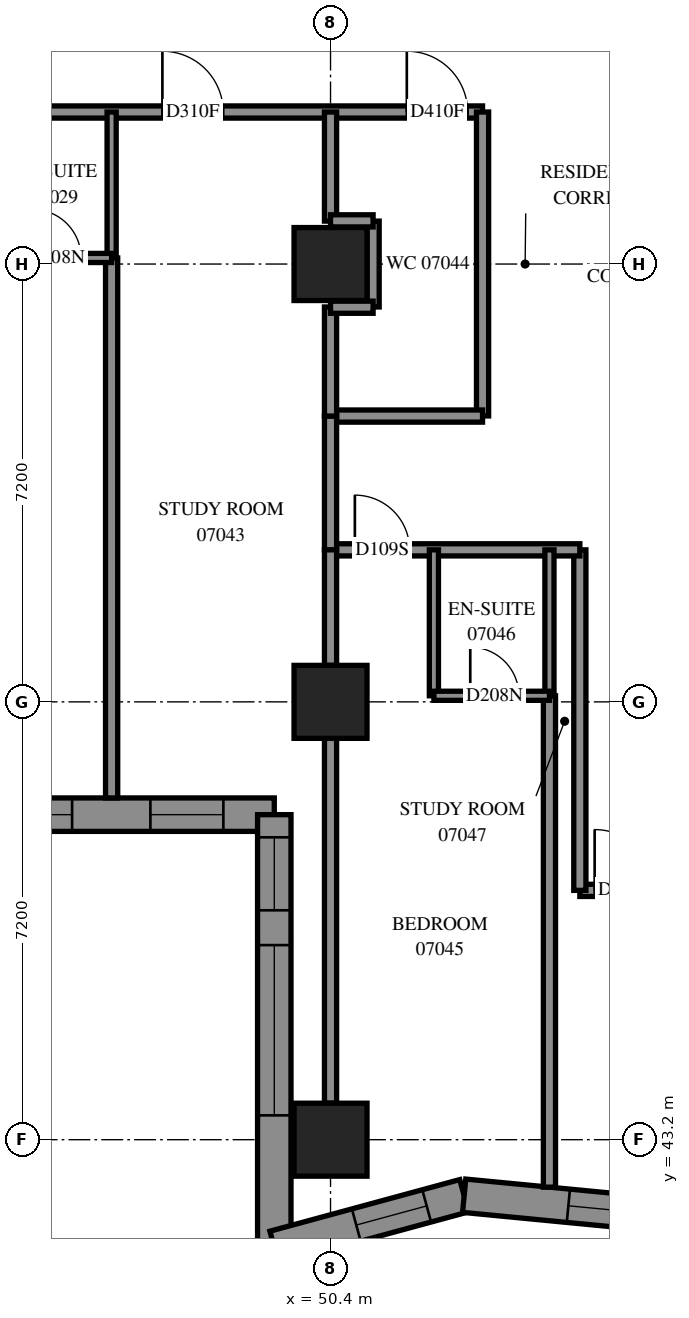
"""IFC4 building model, lengths in metres.
Left out: names, types, materials, properties, quantities, classifications, styles, units other than length and angle.
Written with IfcOpenShell. Run it as: python <this file> out.ifc"""

import sys

from ifc_helpers import new_model, si_unit, direction, frame, frame_2d, origin, origin_2d, place, context, subcontext, project, spatial, polyline, rectangle, outline, extrude, element, fill, save


model = new_model("IFC4")
c1 = context("Model", 3, precision=1e-05, world=origin(), true_north=direction((0.0, 1.0)))
c2 = subcontext(c1, "Body", "Model", "MODEL_VIEW")
j1 = project(units=[si_unit("LENGTHUNIT", "METRE"), si_unit("PLANEANGLEUNIT", "RADIAN")], contexts=[c1])
p1 = place(None, origin())
s1 = spatial("IfcSite", under=j1, at=p1, CompositionType="ELEMENT")
p2 = place(p1, origin())
s2 = spatial("IfcBuilding", under=s1, at=p2, CompositionType="ELEMENT")
p3 = place(p2, frame((0.0, 0.0, 30.4)))
s3 = spatial("IfcBuildingStorey", under=s2, at=p3, CompositionType="ELEMENT", Elevation=30.4)
for number, where, z_axis, x_axis in (
    (1, (50.4, 43.2, 0.0), (0.0, 0.0, 1.0), (1.0, 0.0, 0.0)),
    (2, (50.4, 50.4, 0.0), (0.0, 0.0, 1.0), (1.0, 0.0, 0.0)),
    (3, (50.4, 57.6, 0.0), (0.0, 0.0, 1.0), (1.0, 0.0, 0.0)),
):
    element("IfcColumn", number, at=place(p3, frame(where, z_axis=z_axis, x_axis=x_axis)), inside=s3, PredefinedType="COLUMN", context=c2, shape_type="SweptSolid", body=[
        extrude(rectangle(XDim=1.2, YDim=1.2, at=origin_2d()), origin(), (0.0, 0.0, 1.0), 3.1),
    ])
p4 = place(p3, frame((35.075, 48.545, 0.0), z_axis=(0.0, 0.0, 1.0), x_axis=(1.0, 0.0, 0.0)))
e4 = element("IfcWall", 4, at=p4, inside=s3, PredefinedType="SOLIDWALL", context=c2, shape_type="SweptSolid", body=[
    extrude(outline(polyline([(-0.275, -0.275), (14.125, -0.275), (14.675, 0.275), (0.275, 0.275), (-0.275, -0.275)])), origin(), (0.0, 0.0, 1.0), 3.1),
])
p5 = place(p4, frame((1.325, 0.0, 0.5)))
e5 = element("IfcOpeningElement", 5, at=p5, cuts=e4, PredefinedType="OPENING", context=c2, shape_type="SweptSolid", body=[
    extrude(rectangle(XDim=2.8, YDim=2.45, at=frame_2d((1.4, 1.225))), frame((0.0, 0.285, 0.0), z_axis=(0.0, -1.0, 0.0), x_axis=(1.0, 0.0, 0.0)), (0.0, 0.0, 1.0), 0.57),
])
p6 = place(p4, frame((4.925, 0.0, 0.5)))
e6 = element("IfcOpeningElement", 6, at=p6, cuts=e4, PredefinedType="OPENING", context=c2, shape_type="SweptSolid", body=[
    extrude(rectangle(XDim=2.8, YDim=2.45, at=frame_2d((1.4, 1.225))), frame((0.0, 0.285, 0.0), z_axis=(0.0, -1.0, 0.0), x_axis=(1.0, 0.0, 0.0)), (0.0, 0.0, 1.0), 0.57),
])
p7 = place(p4, frame((8.275, 0.0, 0.5)))
e7 = element("IfcOpeningElement", 7, at=p7, cuts=e4, PredefinedType="OPENING", context=c2, shape_type="SweptSolid", body=[
    extrude(rectangle(XDim=2.8, YDim=2.45, at=frame_2d((1.4, 1.225))), frame((0.0, 0.285, 0.0), z_axis=(0.0, -1.0, 0.0), x_axis=(1.0, 0.0, 0.0)), (0.0, 0.0, 1.0), 0.57),
])
p8 = place(p4, frame((12.363, 0.0, 0.5)))
e8 = element("IfcOpeningElement", 8, at=p8, cuts=e4, PredefinedType="OPENING", context=c2, shape_type="SweptSolid", body=[
    extrude(rectangle(XDim=1.2, YDim=2.45, at=frame_2d((0.6, 1.225))), frame((0.0, 0.285, 0.0), z_axis=(0.0, -1.0, 0.0), x_axis=(1.0, 0.0, 0.0)), (0.0, 0.0, 1.0), 0.57),
])
p9 = place(p3, frame((49.475, 48.545, 0.0), z_axis=(0.0, 0.0, 1.0), x_axis=(0.0, -1.0, 0.0)))
e9 = element("IfcWall", 9, at=p9, inside=s3, PredefinedType="SOLIDWALL", context=c2, shape_type="SweptSolid", body=[
    extrude(outline(polyline([(0.275, -0.275), (7.475, -0.275), (6.755, 0.275), (-0.275, 0.275), (0.275, -0.275)])), origin(), (0.0, 0.0, 1.0), 3.1),
])
p10 = place(p9, frame((2.145, 0.0, 0.5)))
e10 = element("IfcOpeningElement", 10, at=p10, cuts=e9, PredefinedType="OPENING", context=c2, shape_type="SweptSolid", body=[
    extrude(rectangle(XDim=2.8, YDim=2.45, at=frame_2d((1.4, 1.225))), frame((0.0, 0.285, 0.0), z_axis=(0.0, -1.0, 0.0), x_axis=(1.0, 0.0, 0.0)), (0.0, 0.0, 1.0), 0.57),
])
p11 = place(p9, frame((0.372, 0.0, 0.5)))
e11 = element("IfcOpeningElement", 11, at=p11, cuts=e9, PredefinedType="OPENING", context=c2, shape_type="SweptSolid", body=[
    extrude(rectangle(XDim=1.2, YDim=2.45, at=frame_2d((0.6, 1.225))), frame((0.0, 0.285, 0.0), z_axis=(0.0, -1.0, 0.0), x_axis=(1.0, 0.0, 0.0)), (0.0, 0.0, 1.0), 0.57),
])
p12 = place(p3, frame((49.475, 41.43, 0.0), z_axis=(0.0, 0.0, 1.0), x_axis=(0.9649788617, 0.262327651, 0.0)))
e12 = element("IfcWall", 12, at=p12, inside=s3, PredefinedType="SOLIDWALL", context=c2, shape_type="SweptSolid", body=[
    extrude(outline(polyline([(-0.36, -0.275), (3.186, -0.275), (3.286, 0.275), (0.36, 0.275), (-0.36, -0.275)])), origin(), (0.0, 0.0, 1.0), 3.1),
])
p13 = place(p12, frame((1.397, 0.0, 0.5)))
e13 = element("IfcOpeningElement", 13, at=p13, cuts=e12, PredefinedType="OPENING", context=c2, shape_type="SweptSolid", body=[
    extrude(rectangle(XDim=1.2, YDim=2.45, at=frame_2d((0.6, 1.225))), frame((0.0, 0.285, 0.0), z_axis=(0.0, -1.0, 0.0), x_axis=(1.0, 0.0, 0.0)), (0.0, 0.0, 1.0), 0.57),
])
p14 = place(p3, frame((52.598, 42.279, 0.0), z_axis=(0.0, 0.0, 1.0), x_axis=(0.9953800797, -0.0960130045, 0.0)))
e14 = element("IfcWall", 14, at=p14, inside=s3, PredefinedType="SOLIDWALL", context=c2, shape_type="SweptSolid", body=[
    extrude(outline(polyline([(0.05, -0.275), (3.487, -0.275), (3.434, 0.275), (-0.05, 0.275), (0.05, -0.275)])), origin(), (0.0, 0.0, 1.0), 3.1),
])
p15 = place(p14, frame((1.722, 0.0, 0.5)))
e15 = element("IfcOpeningElement", 15, at=p15, cuts=e14, PredefinedType="OPENING", context=c2, shape_type="SweptSolid", body=[
    extrude(rectangle(XDim=1.2, YDim=2.45, at=frame_2d((0.6, 1.225))), frame((0.0, 0.285, 0.0), z_axis=(0.0, -1.0, 0.0), x_axis=(1.0, 0.0, 0.0)), (0.0, 0.0, 1.0), 0.57),
])
p16 = place(p3, frame((28.8, 60.1, 0.0), z_axis=(0.0, 0.0, 1.0), x_axis=(1.0, 0.0, 0.0)))
e16 = element("IfcWall", 16, at=p16, inside=s3, PredefinedType="PARTITIONING", context=c2, shape_type="SweptSolid", body=[
    extrude(rectangle(XDim=24.1, YDim=0.2, at=frame_2d((12.05, 0.0))), origin(), (0.0, 0.0, 1.0), 3.1),
])
p17 = place(p16, frame((4.125, 0.0, 0.0)))
e17 = element("IfcOpeningElement", 17, at=p17, cuts=e16, PredefinedType="OPENING", context=c2, shape_type="SweptSolid", body=[
    extrude(rectangle(XDim=1.0, YDim=2.1, at=frame_2d((0.5, 1.05))), frame((0.0, 0.11, 0.0), z_axis=(0.0, -1.0, 0.0), x_axis=(1.0, 0.0, 0.0)), (0.0, 0.0, 1.0), 0.22),
])
p18 = place(p16, frame((11.62, 0.0, 0.0)))
e18 = element("IfcOpeningElement", 18, at=p18, cuts=e16, PredefinedType="OPENING", context=c2, shape_type="SweptSolid", body=[
    extrude(rectangle(XDim=0.9, YDim=2.1, at=frame_2d((0.45, 1.05))), frame((0.0, 0.11, 0.0), z_axis=(0.0, -1.0, 0.0), x_axis=(1.0, 0.0, 0.0)), (0.0, 0.0, 1.0), 0.22),
])
p19 = place(p16, frame((14.8, 0.0, 0.0)))
e19 = element("IfcOpeningElement", 19, at=p19, cuts=e16, PredefinedType="OPENING", context=c2, shape_type="SweptSolid", body=[
    extrude(rectangle(XDim=0.9, YDim=2.1, at=frame_2d((0.45, 1.05))), frame((0.0, 0.11, 0.0), z_axis=(0.0, -1.0, 0.0), x_axis=(1.0, 0.0, 0.0)), (0.0, 0.0, 1.0), 0.22),
])
p20 = place(p16, frame((18.835, 0.0, 0.0)))
e20 = element("IfcOpeningElement", 20, at=p20, cuts=e16, PredefinedType="OPENING", context=c2, shape_type="SweptSolid", body=[
    extrude(rectangle(XDim=1.0, YDim=2.1, at=frame_2d((0.5, 1.05))), frame((0.0, 0.11, 0.0), z_axis=(0.0, -1.0, 0.0), x_axis=(1.0, 0.0, 0.0)), (0.0, 0.0, 1.0), 0.22),
])
p21 = place(p16, frame((22.854, 0.0, 0.0)))
e21 = element("IfcOpeningElement", 21, at=p21, cuts=e16, PredefinedType="OPENING", context=c2, shape_type="SweptSolid", body=[
    extrude(rectangle(XDim=1.0, YDim=2.1, at=frame_2d((0.5, 1.05))), frame((0.0, 0.11, 0.0), z_axis=(0.0, -1.0, 0.0), x_axis=(1.0, 0.0, 0.0)), (0.0, 0.0, 1.0), 0.22),
])
p22 = place(p3, frame((54.5, 47.3, 0.0), z_axis=(0.0, 0.0, 1.0), x_axis=(1.0, 0.0, 0.0)))
e22 = element("IfcWall", 22, at=p22, inside=s3, PredefinedType="PARTITIONING", context=c2, shape_type="SweptSolid", body=[
    extrude(rectangle(XDim=19.56, YDim=0.2, at=frame_2d((9.78, 0.0))), origin(), (0.0, 0.0, 1.0), 3.1),
])
p23 = place(p22, frame((0.243, 0.0, 0.0)))
e23 = element("IfcOpeningElement", 23, at=p23, cuts=e22, PredefinedType="OPENING", context=c2, shape_type="SweptSolid", body=[
    extrude(rectangle(XDim=1.0, YDim=2.1, at=frame_2d((0.5, 1.05))), frame((0.0, 0.11, 0.0), z_axis=(0.0, -1.0, 0.0), x_axis=(1.0, 0.0, 0.0)), (0.0, 0.0, 1.0), 0.22),
])
p24 = place(p22, frame((5.4, 0.0, 0.0)))
e24 = element("IfcOpeningElement", 24, at=p24, cuts=e22, PredefinedType="OPENING", context=c2, shape_type="SweptSolid", body=[
    extrude(rectangle(XDim=0.9, YDim=2.1, at=frame_2d((0.45, 1.05))), frame((0.0, 0.11, 0.0), z_axis=(0.0, -1.0, 0.0), x_axis=(1.0, 0.0, 0.0)), (0.0, 0.0, 1.0), 0.22),
])
p25 = place(p22, frame((7.1, 0.0, 0.0)))
e25 = element("IfcOpeningElement", 25, at=p25, cuts=e22, PredefinedType="OPENING", context=c2, shape_type="SweptSolid", body=[
    extrude(rectangle(XDim=0.9, YDim=2.1, at=frame_2d((0.45, 1.05))), frame((0.0, 0.11, 0.0), z_axis=(0.0, -1.0, 0.0), x_axis=(1.0, 0.0, 0.0)), (0.0, 0.0, 1.0), 0.22),
])
p26 = place(p22, frame((12.6, 0.0, 0.0)))
e26 = element("IfcOpeningElement", 26, at=p26, cuts=e22, PredefinedType="OPENING", context=c2, shape_type="SweptSolid", body=[
    extrude(rectangle(XDim=0.9, YDim=2.1, at=frame_2d((0.45, 1.05))), frame((0.0, 0.11, 0.0), z_axis=(0.0, -1.0, 0.0), x_axis=(1.0, 0.0, 0.0)), (0.0, 0.0, 1.0), 0.22),
])
p27 = place(p22, frame((14.3, 0.0, 0.0)))
e27 = element("IfcOpeningElement", 27, at=p27, cuts=e22, PredefinedType="OPENING", context=c2, shape_type="SweptSolid", body=[
    extrude(rectangle(XDim=0.9, YDim=2.1, at=frame_2d((0.45, 1.05))), frame((0.0, 0.11, 0.0), z_axis=(0.0, -1.0, 0.0), x_axis=(1.0, 0.0, 0.0)), (0.0, 0.0, 1.0), 0.22),
])
p28 = place(p3, frame((46.8, 48.82, 0.0), z_axis=(0.0, 0.0, 1.0), x_axis=(0.0, 1.0, 0.0)))
e28 = element("IfcWall", 28, at=p28, inside=s3, PredefinedType="PARTITIONING", context=c2, shape_type="SweptSolid", body=[
    extrude(rectangle(XDim=8.88, YDim=0.2, at=frame_2d((4.44, 0.0))), origin(), (0.0, 0.0, 1.0), 3.1),
])
p29 = place(p3, frame((54.0, 42.42, 0.0), z_axis=(0.0, 0.0, 1.0), x_axis=(0.0, 1.0, 0.0)))
e29 = element("IfcWall", 29, at=p29, inside=s3, PredefinedType="PARTITIONING", context=c2, shape_type="SweptSolid", body=[
    extrude(rectangle(XDim=8.08, YDim=0.2, at=frame_2d((4.04, 0.0))), origin(), (0.0, 0.0, 1.0), 3.1),
])
p30 = place(p3, frame((50.4, 43.8, 0.0), z_axis=(0.0, 0.0, 1.0), x_axis=(0.0, 1.0, 0.0)))
e30 = element("IfcWall", 30, at=p30, inside=s3, PredefinedType="PARTITIONING", context=c2, shape_type="SweptSolid", body=[
    extrude(rectangle(XDim=6.0, YDim=0.2, at=frame_2d((3.0, 0.0))), origin(), (0.0, 0.0, 1.0), 2.6),
])
p31 = place(p3, frame((54.5, 47.3, 0.0), z_axis=(0.0, 0.0, 1.0), x_axis=(0.0, 1.0, 0.0)))
e31 = element("IfcWall", 31, at=p31, inside=s3, PredefinedType="PARTITIONING", context=c2, shape_type="SweptSolid", body=[
    extrude(rectangle(XDim=5.6, YDim=0.2, at=frame_2d((2.8, 0.0))), origin(), (0.0, 0.0, 1.0), 3.1),
])
p32 = place(p3, frame((52.9, 55.102, 0.0), z_axis=(0.0, 0.0, 1.0), x_axis=(0.0, 1.0, 0.0)))
e32 = element("IfcWall", 32, at=p32, inside=s3, PredefinedType="PARTITIONING", context=c2, shape_type="SweptSolid", body=[
    extrude(rectangle(XDim=4.998, YDim=0.2, at=frame_2d((2.499, 0.0))), origin(), (0.0, 0.0, 1.0), 3.1),
])
p33 = place(p3, frame((50.4, 52.9, 0.0), z_axis=(0.0, 0.0, 1.0), x_axis=(1.0, 0.0, 0.0)))
e33 = element("IfcWall", 33, at=p33, inside=s3, PredefinedType="PARTITIONING", context=c2, shape_type="SweptSolid", body=[
    extrude(rectangle(XDim=4.1, YDim=0.2, at=frame_2d((2.05, 0.0))), origin(), (0.0, 0.0, 1.0), 3.1),
])
p34 = place(p33, frame((0.4, 0.0, 0.0)))
e34 = element("IfcOpeningElement", 34, at=p34, cuts=e33, PredefinedType="OPENING", context=c2, shape_type="SweptSolid", body=[
    extrude(rectangle(XDim=0.9, YDim=2.1, at=frame_2d((0.45, 1.05))), frame((0.0, 0.11, 0.0), z_axis=(0.0, -1.0, 0.0), x_axis=(1.0, 0.0, 0.0)), (0.0, 0.0, 1.0), 0.22),
])
p35 = place(p3, frame((50.4, 55.1, 0.0), z_axis=(0.0, 0.0, 1.0), x_axis=(1.0, 0.0, 0.0)))
e35 = element("IfcWall", 35, at=p35, inside=s3, PredefinedType="PARTITIONING", context=c2, shape_type="SweptSolid", body=[
    extrude(rectangle(XDim=2.5, YDim=0.2, at=frame_2d((1.25, 0.0))), origin(), (0.0, 0.0, 1.0), 3.1),
])
for number, where, z_axis, x_axis in (
    (36, (46.8, 57.7, 0.0), (0.0, 0.0, 1.0), (0.0, 1.0, 0.0)),
    (37, (52.1, 50.5, 0.0), (0.0, 0.0, 1.0), (0.0, 1.0, 0.0)),
    (38, (54.0, 50.5, 0.0), (0.0, 0.0, 1.0), (0.0, 1.0, 0.0)),
):
    element("IfcWall", number, at=place(p3, frame(where, z_axis=z_axis, x_axis=x_axis)), inside=s3, PredefinedType="PARTITIONING", context=c2, shape_type="SweptSolid", body=[
        extrude(rectangle(XDim=2.4, YDim=0.15, at=frame_2d((1.2, 0.0))), origin(), (0.0, 0.0, 1.0), 3.1),
    ])
p36 = place(p3, frame((50.4, 52.9, 0.0), z_axis=(0.0, 0.0, 1.0), x_axis=(0.0, 1.0, 0.0)))
e39 = element("IfcWall", 39, at=p36, inside=s3, PredefinedType="PARTITIONING", context=c2, shape_type="SweptSolid", body=[
    extrude(rectangle(XDim=2.2, YDim=0.2, at=frame_2d((1.1, 0.0))), origin(), (0.0, 0.0, 1.0), 3.1),
])
p37 = place(p3, frame((44.9, 57.7, 0.0), z_axis=(0.0, 0.0, 1.0), x_axis=(1.0, 0.0, 0.0)))
e40 = element("IfcWall", 40, at=p37, inside=s3, PredefinedType="PARTITIONING", context=c2, shape_type="SweptSolid", body=[
    extrude(rectangle(XDim=1.9, YDim=0.15, at=frame_2d((0.95, 0.0))), origin(), (0.0, 0.0, 1.0), 3.1),
])
p38 = place(p37, frame((0.598, 0.0, 0.0)))
e41 = element("IfcOpeningElement", 41, at=p38, cuts=e40, PredefinedType="OPENING", context=c2, shape_type="SweptSolid", body=[
    extrude(rectangle(XDim=0.8, YDim=2.1, at=frame_2d((0.4, 1.05))), frame((0.0, 0.085, 0.0), z_axis=(0.0, -1.0, 0.0), x_axis=(1.0, 0.0, 0.0)), (0.0, 0.0, 1.0), 0.17),
])
p39 = place(p3, frame((50.4, 51.0, 0.0), z_axis=(0.0, 0.0, 1.0), x_axis=(0.0, 1.0, 0.0)))
e42 = element("IfcWall", 42, at=p39, inside=s3, PredefinedType="PARTITIONING", context=c2, shape_type="SweptSolid", body=[
    extrude(rectangle(XDim=1.9, YDim=0.2, at=frame_2d((0.95, 0.0))), origin(), (0.0, 0.0, 1.0), 3.1),
])
p40 = place(p3, frame((52.1, 50.5, 0.0), z_axis=(0.0, 0.0, 1.0), x_axis=(1.0, 0.0, 0.0)))
e43 = element("IfcWall", 43, at=p40, inside=s3, PredefinedType="PARTITIONING", context=c2, shape_type="SweptSolid", body=[
    extrude(rectangle(XDim=1.9, YDim=0.15, at=frame_2d((0.95, 0.0))), origin(), (0.0, 0.0, 1.0), 3.1),
])
p41 = place(p40, frame((0.598, 0.0, 0.0)))
e44 = element("IfcOpeningElement", 44, at=p41, cuts=e43, PredefinedType="OPENING", context=c2, shape_type="SweptSolid", body=[
    extrude(rectangle(XDim=0.8, YDim=2.1, at=frame_2d((0.4, 1.05))), frame((0.0, 0.085, 0.0), z_axis=(0.0, -1.0, 0.0), x_axis=(1.0, 0.0, 0.0)), (0.0, 0.0, 1.0), 0.17),
])
for number, where, z_axis, x_axis in (
    (45, (50.4, 58.306, 0.0), (0.0, 0.0, 1.0), (0.0, 1.0, 0.0)),
    (46, (50.4, 55.1, 0.0), (0.0, 0.0, 1.0), (0.0, 1.0, 0.0)),
):
    element("IfcWall", number, at=place(p3, frame(where, z_axis=z_axis, x_axis=x_axis)), inside=s3, PredefinedType="PARTITIONING", context=c2, shape_type="SweptSolid", body=[
        extrude(rectangle(XDim=1.794, YDim=0.2, at=frame_2d((0.897, 0.0))), origin(), (0.0, 0.0, 1.0), 3.1),
    ])
p42 = place(p3, frame((51.1, 56.894, 0.0), z_axis=(0.0, 0.0, 1.0), x_axis=(0.0, 1.0, 0.0)))
e47 = element("IfcWall", 47, at=p42, inside=s3, PredefinedType="PARTITIONING", context=c2, shape_type="SweptSolid", body=[
    extrude(rectangle(XDim=1.412, YDim=0.2, at=frame_2d((0.706, 0.0))), origin(), (0.0, 0.0, 1.0), 3.1),
])
for number, where, z_axis, x_axis in (
    (48, (50.4, 58.31, 0.0), (0.0, 0.0, 1.0), (1.0, 0.0, 0.0)),
    (49, (50.4, 56.89, 0.0), (0.0, 0.0, 1.0), (1.0, 0.0, 0.0)),
):
    element("IfcWall", number, at=place(p3, frame(where, z_axis=z_axis, x_axis=x_axis)), inside=s3, PredefinedType="PARTITIONING", context=c2, shape_type="SweptSolid", body=[
        extrude(rectangle(XDim=0.7, YDim=0.2, at=frame_2d((0.35, 0.0))), origin(), (0.0, 0.0, 1.0), 3.1),
    ])
p43 = place(p7, origin())
e50 = element("IfcWindow", 50, at=p43, inside=s3, PartitioningType="SINGLE_PANEL", PredefinedType="WINDOW", context=c2, shape_type="SweptSolid", body=[
    extrude(rectangle(XDim=2.8, YDim=2.45, at=frame_2d((1.4, 1.225))), frame((0.0, 0.155, 0.0), z_axis=(0.0, -1.0, 0.0), x_axis=(1.0, 0.0, 0.0)), (0.0, 0.0, 1.0), 0.06),
])
fill(e7, e50)
p44 = place(p8, origin())
e51 = element("IfcWindow", 51, at=p44, inside=s3, PartitioningType="SINGLE_PANEL", PredefinedType="WINDOW", context=c2, shape_type="SweptSolid", body=[
    extrude(rectangle(XDim=1.2, YDim=2.45, at=frame_2d((0.6, 1.225))), frame((0.0, 0.155, 0.0), z_axis=(0.0, -1.0, 0.0), x_axis=(1.0, 0.0, 0.0)), (0.0, 0.0, 1.0), 0.06),
])
fill(e8, e51)
p45 = place(p10, origin())
e52 = element("IfcWindow", 52, at=p45, inside=s3, PartitioningType="SINGLE_PANEL", PredefinedType="WINDOW", context=c2, shape_type="SweptSolid", body=[
    extrude(rectangle(XDim=2.8, YDim=2.45, at=frame_2d((1.4, 1.225))), frame((0.0, 0.155, 0.0), z_axis=(0.0, -1.0, 0.0), x_axis=(1.0, 0.0, 0.0)), (0.0, 0.0, 1.0), 0.06),
])
fill(e10, e52)
p46 = place(p11, origin())
e53 = element("IfcWindow", 53, at=p46, inside=s3, PartitioningType="SINGLE_PANEL", PredefinedType="WINDOW", context=c2, shape_type="SweptSolid", body=[
    extrude(rectangle(XDim=1.2, YDim=2.45, at=frame_2d((0.6, 1.225))), frame((0.0, 0.155, 0.0), z_axis=(0.0, -1.0, 0.0), x_axis=(1.0, 0.0, 0.0)), (0.0, 0.0, 1.0), 0.06),
])
fill(e11, e53)
p47 = place(p13, origin())
e54 = element("IfcWindow", 54, at=p47, inside=s3, PartitioningType="SINGLE_PANEL", PredefinedType="WINDOW", context=c2, shape_type="SweptSolid", body=[
    extrude(rectangle(XDim=1.2, YDim=2.45, at=frame_2d((0.6, 1.225))), frame((0.0, 0.155, 0.0), z_axis=(0.0, -1.0, 0.0), x_axis=(1.0, 0.0, 0.0)), (0.0, 0.0, 1.0), 0.06),
])
fill(e13, e54)
p48 = place(p15, origin())
e55 = element("IfcWindow", 55, at=p48, inside=s3, PartitioningType="SINGLE_PANEL", PredefinedType="WINDOW", context=c2, shape_type="SweptSolid", body=[
    extrude(rectangle(XDim=1.2, YDim=2.45, at=frame_2d((0.6, 1.225))), frame((0.0, 0.155, 0.0), z_axis=(0.0, -1.0, 0.0), x_axis=(1.0, 0.0, 0.0)), (0.0, 0.0, 1.0), 0.06),
])
fill(e15, e55)
p49 = place(p38, origin())
e56 = element("IfcDoor", 56, at=p49, inside=s3, OperationType="SINGLE_SWING_RIGHT", PredefinedType="DOOR", context=c2, shape_type="SweptSolid", body=[
    extrude(rectangle(XDim=0.8, YDim=2.1, at=frame_2d((0.4, 1.05))), frame((0.0, 0.025, 0.0), z_axis=(0.0, -1.0, 0.0), x_axis=(1.0, 0.0, 0.0)), (0.0, 0.0, 1.0), 0.05),
])
fill(e41, e56)
p50 = place(p20, origin())
e57 = element("IfcDoor", 57, at=p50, inside=s3, OperationType="SINGLE_SWING_RIGHT", PredefinedType="DOOR", context=c2, shape_type="SweptSolid", body=[
    extrude(rectangle(XDim=1.0, YDim=2.1, at=frame_2d((0.5, 1.05))), frame((0.0, 0.025, 0.0), z_axis=(0.0, -1.0, 0.0), x_axis=(1.0, 0.0, 0.0)), (0.0, 0.0, 1.0), 0.05),
])
fill(e20, e57)
p51 = place(p21, origin())
e58 = element("IfcDoor", 58, at=p51, inside=s3, OperationType="SINGLE_SWING_LEFT", PredefinedType="DOOR", context=c2, shape_type="SweptSolid", body=[
    extrude(rectangle(XDim=1.0, YDim=2.1, at=frame_2d((0.5, 1.05))), frame((0.0, 0.025, 0.0), z_axis=(0.0, -1.0, 0.0), x_axis=(1.0, 0.0, 0.0)), (0.0, 0.0, 1.0), 0.05),
])
fill(e21, e58)
p52 = place(p34, origin())
e59 = element("IfcDoor", 59, at=p52, inside=s3, OperationType="SINGLE_SWING_LEFT", PredefinedType="DOOR", context=c2, shape_type="SweptSolid", body=[
    extrude(rectangle(XDim=0.9, YDim=2.1, at=frame_2d((0.45, 1.05))), frame((0.0, 0.025, 0.0), z_axis=(0.0, -1.0, 0.0), x_axis=(1.0, 0.0, 0.0)), (0.0, 0.0, 1.0), 0.05),
])
fill(e34, e59)
p53 = place(p41, origin())
e60 = element("IfcDoor", 60, at=p53, inside=s3, OperationType="SINGLE_SWING_RIGHT", PredefinedType="DOOR", context=c2, shape_type="SweptSolid", body=[
    extrude(rectangle(XDim=0.8, YDim=2.1, at=frame_2d((0.4, 1.05))), frame((0.0, 0.025, 0.0), z_axis=(0.0, -1.0, 0.0), x_axis=(1.0, 0.0, 0.0)), (0.0, 0.0, 1.0), 0.05),
])
fill(e44, e60)
p54 = place(p23, origin())
e61 = element("IfcDoor", 61, at=p54, inside=s3, OperationType="SINGLE_SWING_RIGHT", PredefinedType="DOOR", context=c2, shape_type="SweptSolid", body=[
    extrude(rectangle(XDim=1.0, YDim=2.1, at=frame_2d((0.5, 1.05))), frame((0.0, 0.025, 0.0), z_axis=(0.0, -1.0, 0.0), x_axis=(1.0, 0.0, 0.0)), (0.0, 0.0, 1.0), 0.05),
])
fill(e23, e61)
save(model, sys.argv[1])
